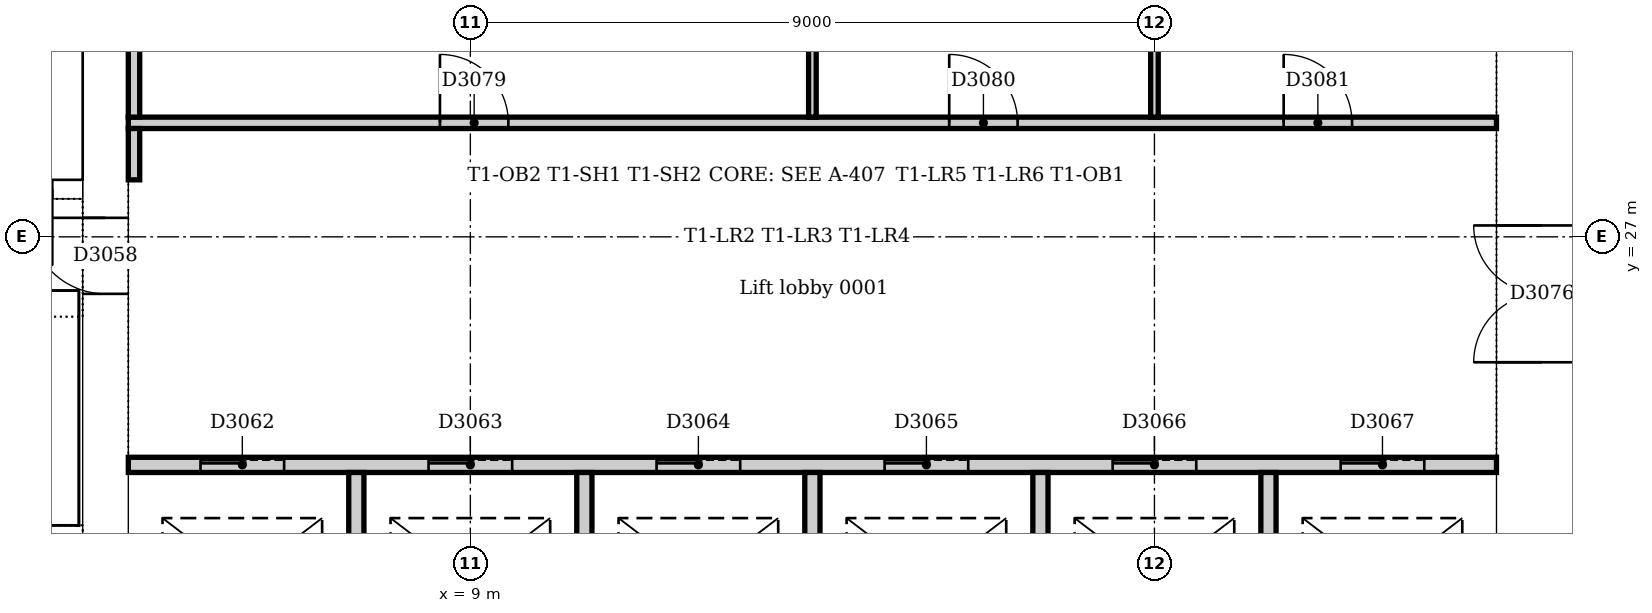
"""IFC4 building model, lengths in metres.
Left out: names, types, materials, properties, quantities, classifications, styles, units other than length and angle.
Written with IfcOpenShell. Run it as: python <this file> out.ifc"""

import sys

from ifc_helpers import new_model, si_unit, direction, frame, frame_2d, origin, place, context, subcontext, project, spatial, rectangle, extrude, element, fill, save


model = new_model("IFC4")
c1 = context("Model", 3, precision=1e-05, world=origin(), true_north=direction((0.0, 1.0)))
c2 = subcontext(c1, "Body", "Model", "MODEL_VIEW")
j1 = project(units=[si_unit("LENGTHUNIT", "METRE"), si_unit("PLANEANGLEUNIT", "RADIAN")], contexts=[c1])
p1 = place(None, origin())
s1 = spatial("IfcSite", under=j1, at=p1, CompositionType="ELEMENT")
p2 = place(p1, origin())
s2 = spatial("IfcBuilding", under=s1, at=p2, CompositionType="ELEMENT")
p3 = place(p2, origin())
s3 = spatial("IfcBuildingStorey", under=s2, at=p3, CompositionType="ELEMENT", Elevation=0.0)
p4 = place(p3, frame((23.1, 21.0, 0.0), z_axis=(0.0, 0.0, 1.0), x_axis=(0.0, 1.0, 0.0)))
e1 = element("IfcWall", 1, at=p4, inside=s3, PredefinedType="SOLIDWALL", context=c2, shape_type="SweptSolid", body=[
    extrude(rectangle(XDim=10.5, YDim=1.2, at=frame_2d((5.25, 0.0))), origin(), (0.0, 0.0, 1.0), 6.0),
])
p5 = place(p4, frame((4.35, 0.0, 0.0)))
e2 = element("IfcOpeningElement", 2, at=p5, cuts=e1, PredefinedType="OPENING", context=c2, shape_type="SweptSolid", body=[
    extrude(rectangle(XDim=1.8, YDim=2.1, at=frame_2d((0.9, 1.05))), frame((0.0, 0.61, 0.0), z_axis=(0.0, -1.0, 0.0), x_axis=(1.0, 0.0, 0.0)), (0.0, 0.0, 1.0), 1.22),
])
p6 = place(p3, frame((4.2, 31.5, 0.0), z_axis=(0.0, 0.0, 1.0), x_axis=(0.0, -1.0, 0.0)))
e3 = element("IfcWall", 3, at=p6, inside=s3, PredefinedType="SOLIDWALL", context=c2, shape_type="SweptSolid", body=[
    extrude(rectangle(XDim=10.5, YDim=0.6, at=frame_2d((5.25, 0.0))), origin(), (0.0, 0.0, 1.0), 6.0),
])
p7 = place(p6, frame((4.25, 0.0, 0.0)))
e4 = element("IfcOpeningElement", 4, at=p7, cuts=e3, PredefinedType="OPENING", context=c2, shape_type="SweptSolid", body=[
    extrude(rectangle(XDim=1.0, YDim=2.1, at=frame_2d((0.5, 1.05))), frame((0.0, 0.31, 0.0), z_axis=(0.0, -1.0, 0.0), x_axis=(1.0, 0.0, 0.0)), (0.0, 0.0, 1.0), 0.62),
])
p8 = place(p3, frame((3.9, 27.625, 0.0), z_axis=(0.0, 0.0, 1.0), x_axis=(-1.0, 0.0, 0.0)))
e5 = element("IfcWall", 5, at=p8, inside=s3, PredefinedType="SOLIDWALL", context=c2, shape_type="SweptSolid", body=[
    extrude(rectangle(XDim=3.54, YDim=0.25, at=frame_2d((1.77, 0.0))), origin(), (0.0, 0.0, 1.0), 6.0),
])
p9 = place(p8, frame((0.4, 0.0, 0.0)))
e6 = element("IfcOpeningElement", 6, at=p9, cuts=e5, PredefinedType="OPENING", context=c2, shape_type="SweptSolid", body=[
    extrude(rectangle(XDim=1.0, YDim=2.1, at=frame_2d((0.5, 1.05))), frame((0.0, 0.135, 0.0), z_axis=(0.0, -1.0, 0.0), x_axis=(1.0, 0.0, 0.0)), (0.0, 0.0, 1.0), 0.27),
])
p10 = place(p3, frame((4.5, 24.0, 0.0), z_axis=(0.0, 0.0, 1.0), x_axis=(1.0, 0.0, 0.0)))
e7 = element("IfcWall", 7, at=p10, inside=s3, PredefinedType="PARTITIONING", context=c2, shape_type="SweptSolid", body=[
    extrude(rectangle(XDim=18.0, YDim=0.2, at=frame_2d((9.0, 0.0))), origin(), (0.0, 0.0, 1.0), 5.7),
])
p11 = place(p10, frame((0.95, 0.0, 0.0)))
e8 = element("IfcOpeningElement", 8, at=p11, cuts=e7, PredefinedType="OPENING", context=c2, shape_type="SweptSolid", body=[
    extrude(rectangle(XDim=1.1, YDim=2.1, at=frame_2d((0.55, 1.05))), frame((0.0, 0.11, 0.0), z_axis=(0.0, -1.0, 0.0), x_axis=(1.0, 0.0, 0.0)), (0.0, 0.0, 1.0), 0.22),
])
p12 = place(p10, frame((3.95, 0.0, 0.0)))
e9 = element("IfcOpeningElement", 9, at=p12, cuts=e7, PredefinedType="OPENING", context=c2, shape_type="SweptSolid", body=[
    extrude(rectangle(XDim=1.1, YDim=2.1, at=frame_2d((0.55, 1.05))), frame((0.0, 0.11, 0.0), z_axis=(0.0, -1.0, 0.0), x_axis=(1.0, 0.0, 0.0)), (0.0, 0.0, 1.0), 0.22),
])
p13 = place(p10, frame((6.95, 0.0, 0.0)))
e10 = element("IfcOpeningElement", 10, at=p13, cuts=e7, PredefinedType="OPENING", context=c2, shape_type="SweptSolid", body=[
    extrude(rectangle(XDim=1.1, YDim=2.1, at=frame_2d((0.55, 1.05))), frame((0.0, 0.11, 0.0), z_axis=(0.0, -1.0, 0.0), x_axis=(1.0, 0.0, 0.0)), (0.0, 0.0, 1.0), 0.22),
])
p14 = place(p10, frame((9.95, 0.0, 0.0)))
e11 = element("IfcOpeningElement", 11, at=p14, cuts=e7, PredefinedType="OPENING", context=c2, shape_type="SweptSolid", body=[
    extrude(rectangle(XDim=1.1, YDim=2.1, at=frame_2d((0.55, 1.05))), frame((0.0, 0.11, 0.0), z_axis=(0.0, -1.0, 0.0), x_axis=(1.0, 0.0, 0.0)), (0.0, 0.0, 1.0), 0.22),
])
p15 = place(p10, frame((12.95, 0.0, 0.0)))
e12 = element("IfcOpeningElement", 12, at=p15, cuts=e7, PredefinedType="OPENING", context=c2, shape_type="SweptSolid", body=[
    extrude(rectangle(XDim=1.1, YDim=2.1, at=frame_2d((0.55, 1.05))), frame((0.0, 0.11, 0.0), z_axis=(0.0, -1.0, 0.0), x_axis=(1.0, 0.0, 0.0)), (0.0, 0.0, 1.0), 0.22),
])
p16 = place(p10, frame((15.95, 0.0, 0.0)))
e13 = element("IfcOpeningElement", 13, at=p16, cuts=e7, PredefinedType="OPENING", context=c2, shape_type="SweptSolid", body=[
    extrude(rectangle(XDim=1.1, YDim=2.1, at=frame_2d((0.55, 1.05))), frame((0.0, 0.11, 0.0), z_axis=(0.0, -1.0, 0.0), x_axis=(1.0, 0.0, 0.0)), (0.0, 0.0, 1.0), 0.22),
])
for number, where, z_axis, x_axis in (
    (14, (7.5, 21.0, 0.0), (0.0, 0.0, 1.0), (0.0, 1.0, 0.0)),
    (15, (10.5, 21.0, 0.0), (0.0, 0.0, 1.0), (0.0, 1.0, 0.0)),
    (16, (13.5, 21.0, 0.0), (0.0, 0.0, 1.0), (0.0, 1.0, 0.0)),
    (17, (16.5, 21.0, 0.0), (0.0, 0.0, 1.0), (0.0, 1.0, 0.0)),
    (18, (19.5, 21.0, 0.0), (0.0, 0.0, 1.0), (0.0, 1.0, 0.0)),
):
    element("IfcWall", number, at=place(p3, frame(where, z_axis=z_axis, x_axis=x_axis)), inside=s3, PredefinedType="PARTITIONING", context=c2, shape_type="SweptSolid", body=[
        extrude(rectangle(XDim=2.9, YDim=0.2, at=frame_2d((1.45, 0.0))), origin(), (0.0, 0.0, 1.0), 5.7),
    ])
p17 = place(p3, frame((4.5, 28.5, 0.0), z_axis=(0.0, 0.0, 1.0), x_axis=(1.0, 0.0, 0.0)))
e19 = element("IfcWall", 19, at=p17, inside=s3, PredefinedType="PARTITIONING", context=c2, shape_type="SweptSolid", body=[
    extrude(rectangle(XDim=18.0, YDim=0.15, at=frame_2d((9.0, 0.0))), origin(), (0.0, 0.0, 1.0), 5.7),
])
p18 = place(p17, frame((4.1, 0.0, 0.0)))
e20 = element("IfcOpeningElement", 20, at=p18, cuts=e19, PredefinedType="OPENING", context=c2, shape_type="SweptSolid", body=[
    extrude(rectangle(XDim=0.9, YDim=2.1, at=frame_2d((0.45, 1.05))), frame((0.0, 0.085, 0.0), z_axis=(0.0, -1.0, 0.0), x_axis=(1.0, 0.0, 0.0)), (0.0, 0.0, 1.0), 0.17),
])
p19 = place(p17, frame((10.8, 0.0, 0.0)))
e21 = element("IfcOpeningElement", 21, at=p19, cuts=e19, PredefinedType="OPENING", context=c2, shape_type="SweptSolid", body=[
    extrude(rectangle(XDim=0.9, YDim=2.1, at=frame_2d((0.45, 1.05))), frame((0.0, 0.085, 0.0), z_axis=(0.0, -1.0, 0.0), x_axis=(1.0, 0.0, 0.0)), (0.0, 0.0, 1.0), 0.17),
])
p20 = place(p17, frame((15.2, 0.0, 0.0)))
e22 = element("IfcOpeningElement", 22, at=p20, cuts=e19, PredefinedType="OPENING", context=c2, shape_type="SweptSolid", body=[
    extrude(rectangle(XDim=0.9, YDim=2.1, at=frame_2d((0.45, 1.05))), frame((0.0, 0.085, 0.0), z_axis=(0.0, -1.0, 0.0), x_axis=(1.0, 0.0, 0.0)), (0.0, 0.0, 1.0), 0.17),
])
p21 = place(p3, frame((4.575, 27.75, 0.0), z_axis=(0.0, 0.0, 1.0), x_axis=(0.0, 1.0, 0.0)))
e23 = element("IfcWall", 23, at=p21, inside=s3, PredefinedType="PARTITIONING", context=c2, shape_type="SweptSolid", body=[
    extrude(rectangle(XDim=0.675, YDim=0.15, at=frame_2d((0.338, 0.0))), origin(), (0.0, 0.0, 1.0), 5.7),
])
p22 = place(p3, frame((4.575, 28.575, 0.0), z_axis=(0.0, 0.0, 1.0), x_axis=(0.0, 1.0, 0.0)))
e24 = element("IfcWall", 24, at=p22, inside=s3, PredefinedType="PARTITIONING", context=c2, shape_type="SweptSolid", body=[
    extrude(rectangle(XDim=2.675, YDim=0.15, at=frame_2d((1.337, 0.0))), origin(), (0.0, 0.0, 1.0), 5.7),
])
for number, where, z_axis, x_axis in (
    (25, (13.5, 28.575, 0.0), (0.0, 0.0, 1.0), (0.0, 1.0, 0.0)),
    (26, (18.0, 28.575, 0.0), (0.0, 0.0, 1.0), (0.0, 1.0, 0.0)),
):
    element("IfcWall", number, at=place(p3, frame(where, z_axis=z_axis, x_axis=x_axis)), inside=s3, PredefinedType="PARTITIONING", context=c2, shape_type="SweptSolid", body=[
        extrude(rectangle(XDim=2.675, YDim=0.1, at=frame_2d((1.337, 0.0))), origin(), (0.0, 0.0, 1.0), 5.7),
    ])
p23 = place(p7, frame((1.0, 0.0, 0.0), z_axis=(0.0, 0.0, 1.0), x_axis=(-1.0, 0.0, 0.0)))
e27 = element("IfcDoor", 27, at=p23, inside=s3, OperationType="SINGLE_SWING_RIGHT", PredefinedType="DOOR", context=c2, shape_type="SweptSolid", body=[
    extrude(rectangle(XDim=1.0, YDim=2.1, at=frame_2d((0.5, 1.05))), frame((0.0, 0.025, 0.0), z_axis=(0.0, -1.0, 0.0), x_axis=(1.0, 0.0, 0.0)), (0.0, 0.0, 1.0), 0.05),
])
fill(e4, e27)
p24 = place(p11, origin())
e28 = element("IfcDoor", 28, at=p24, inside=s3, OperationType="SLIDING_TO_LEFT", PredefinedType="DOOR", context=c2, shape_type="SweptSolid", body=[
    extrude(rectangle(XDim=1.1, YDim=2.1, at=frame_2d((0.55, 1.05))), frame((0.0, 0.025, 0.0), z_axis=(0.0, -1.0, 0.0), x_axis=(1.0, 0.0, 0.0)), (0.0, 0.0, 1.0), 0.05),
])
fill(e8, e28)
p25 = place(p12, origin())
e29 = element("IfcDoor", 29, at=p25, inside=s3, OperationType="SLIDING_TO_LEFT", PredefinedType="DOOR", context=c2, shape_type="SweptSolid", body=[
    extrude(rectangle(XDim=1.1, YDim=2.1, at=frame_2d((0.55, 1.05))), frame((0.0, 0.025, 0.0), z_axis=(0.0, -1.0, 0.0), x_axis=(1.0, 0.0, 0.0)), (0.0, 0.0, 1.0), 0.05),
])
fill(e9, e29)
p26 = place(p13, origin())
e30 = element("IfcDoor", 30, at=p26, inside=s3, OperationType="SLIDING_TO_LEFT", PredefinedType="DOOR", context=c2, shape_type="SweptSolid", body=[
    extrude(rectangle(XDim=1.1, YDim=2.1, at=frame_2d((0.55, 1.05))), frame((0.0, 0.025, 0.0), z_axis=(0.0, -1.0, 0.0), x_axis=(1.0, 0.0, 0.0)), (0.0, 0.0, 1.0), 0.05),
])
fill(e10, e30)
p27 = place(p14, origin())
e31 = element("IfcDoor", 31, at=p27, inside=s3, OperationType="SLIDING_TO_LEFT", PredefinedType="DOOR", context=c2, shape_type="SweptSolid", body=[
    extrude(rectangle(XDim=1.1, YDim=2.1, at=frame_2d((0.55, 1.05))), frame((0.0, 0.025, 0.0), z_axis=(0.0, -1.0, 0.0), x_axis=(1.0, 0.0, 0.0)), (0.0, 0.0, 1.0), 0.05),
])
fill(e11, e31)
p28 = place(p15, origin())
e32 = element("IfcDoor", 32, at=p28, inside=s3, OperationType="SLIDING_TO_LEFT", PredefinedType="DOOR", context=c2, shape_type="SweptSolid", body=[
    extrude(rectangle(XDim=1.1, YDim=2.1, at=frame_2d((0.55, 1.05))), frame((0.0, 0.025, 0.0), z_axis=(0.0, -1.0, 0.0), x_axis=(1.0, 0.0, 0.0)), (0.0, 0.0, 1.0), 0.05),
])
fill(e12, e32)
p29 = place(p16, origin())
e33 = element("IfcDoor", 33, at=p29, inside=s3, OperationType="SLIDING_TO_LEFT", PredefinedType="DOOR", context=c2, shape_type="SweptSolid", body=[
    extrude(rectangle(XDim=1.1, YDim=2.1, at=frame_2d((0.55, 1.05))), frame((0.0, 0.025, 0.0), z_axis=(0.0, -1.0, 0.0), x_axis=(1.0, 0.0, 0.0)), (0.0, 0.0, 1.0), 0.05),
])
fill(e13, e33)
p30 = place(p5, origin())
e34 = element("IfcDoor", 34, at=p30, inside=s3, OperationType="DOUBLE_DOOR_DOUBLE_SWING", PredefinedType="DOOR", context=c2, shape_type="SweptSolid", body=[
    extrude(rectangle(XDim=1.8, YDim=2.1, at=frame_2d((0.9, 1.05))), frame((0.0, 0.025, 0.0), z_axis=(0.0, -1.0, 0.0), x_axis=(1.0, 0.0, 0.0)), (0.0, 0.0, 1.0), 0.05),
])
fill(e2, e34)
p31 = place(p18, origin())
e35 = element("IfcDoor", 35, at=p31, inside=s3, OperationType="SINGLE_SWING_LEFT", PredefinedType="DOOR", context=c2, shape_type="SweptSolid", body=[
    extrude(rectangle(XDim=0.9, YDim=2.1, at=frame_2d((0.45, 1.05))), frame((0.0, 0.025, 0.0), z_axis=(0.0, -1.0, 0.0), x_axis=(1.0, 0.0, 0.0)), (0.0, 0.0, 1.0), 0.05),
])
fill(e20, e35)
p32 = place(p19, origin())
e36 = element("IfcDoor", 36, at=p32, inside=s3, OperationType="SINGLE_SWING_LEFT", PredefinedType="DOOR", context=c2, shape_type="SweptSolid", body=[
    extrude(rectangle(XDim=0.9, YDim=2.1, at=frame_2d((0.45, 1.05))), frame((0.0, 0.025, 0.0), z_axis=(0.0, -1.0, 0.0), x_axis=(1.0, 0.0, 0.0)), (0.0, 0.0, 1.0), 0.05),
])
fill(e21, e36)
p33 = place(p20, origin())
e37 = element("IfcDoor", 37, at=p33, inside=s3, OperationType="SINGLE_SWING_LEFT", PredefinedType="DOOR", context=c2, shape_type="SweptSolid", body=[
    extrude(rectangle(XDim=0.9, YDim=2.1, at=frame_2d((0.45, 1.05))), frame((0.0, 0.025, 0.0), z_axis=(0.0, -1.0, 0.0), x_axis=(1.0, 0.0, 0.0)), (0.0, 0.0, 1.0), 0.05),
])
fill(e22, e37)
save(model, sys.argv[1])
